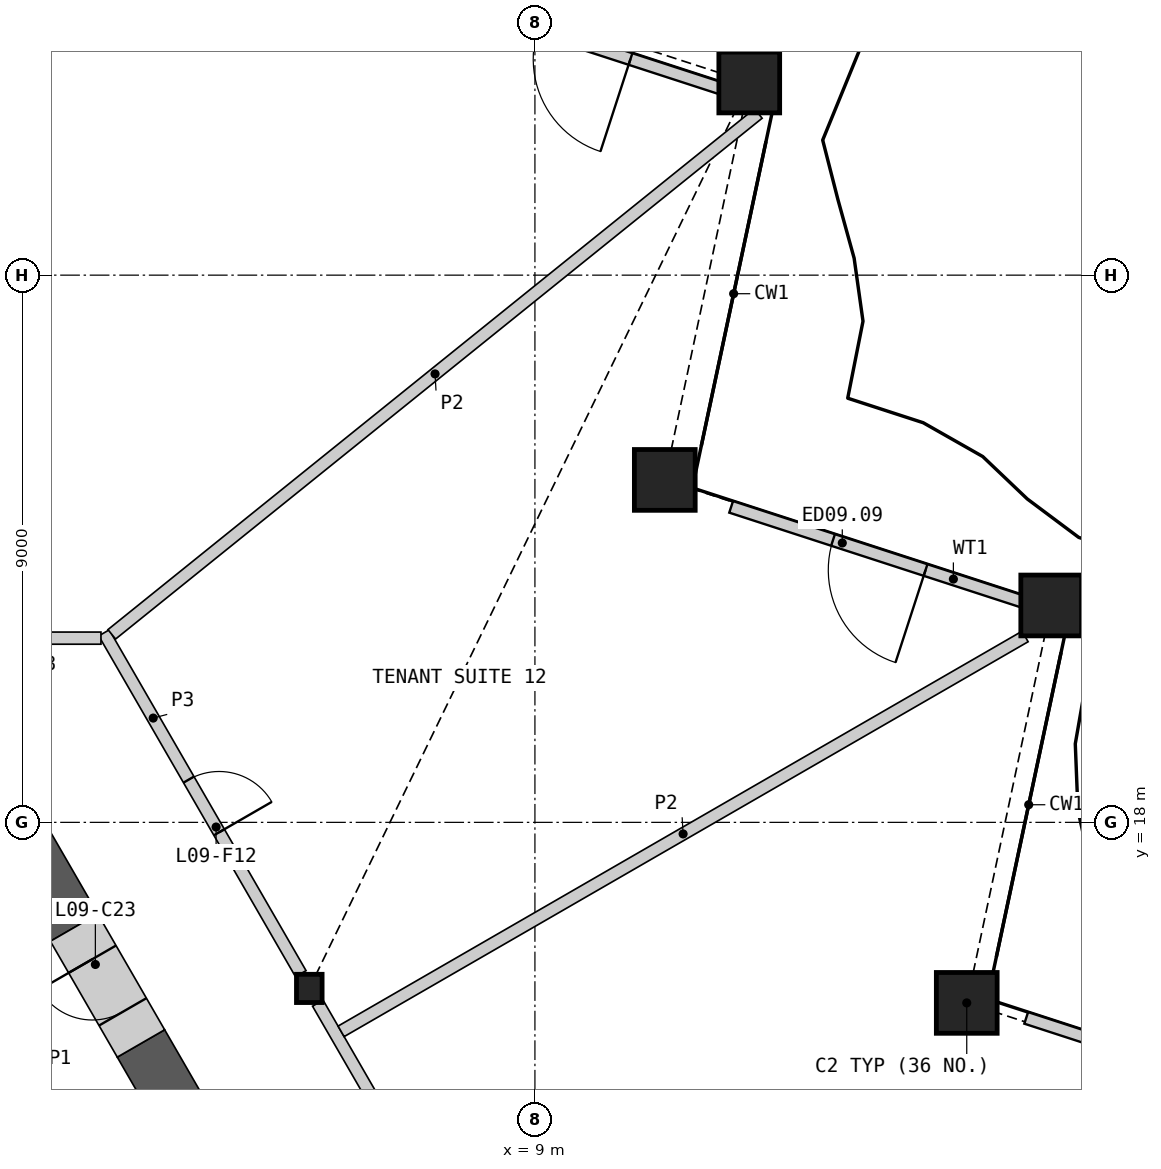
"""IFC4 building model, lengths in metres.
Left out: names, types, materials, properties, quantities, classifications, styles, units other than length and angle.
Written with IfcOpenShell. Run it as: python <this file> out.ifc"""

import sys

from ifc_helpers import new_model, si_unit, direction, frame, frame_2d, origin, origin_2d, place, context, subcontext, project, spatial, rectangle, hollow_rectangle, i_section, extrude, element, fill, save


model = new_model("IFC4")
c1 = context("Model", 3, precision=1e-05, world=origin(), true_north=direction((0.0, 1.0)))
c2 = subcontext(c1, "Body", "Model", "MODEL_VIEW")
j1 = project(units=[si_unit("LENGTHUNIT", "METRE"), si_unit("PLANEANGLEUNIT", "RADIAN")], contexts=[c1])
p1 = place(None, origin())
s1 = spatial("IfcSite", under=j1, at=p1, CompositionType="ELEMENT")
p2 = place(p1, origin())
s2 = spatial("IfcBuilding", under=s1, at=p2, CompositionType="ELEMENT")
p3 = place(p2, frame((0.0, 0.0, 46.8)))
s3 = spatial("IfcBuildingStorey", under=s2, at=p3, CompositionType="ELEMENT", Elevation=46.8)
for number, where, z_axis, x_axis in (
    (1, (16.102, 15.031, 0.0), (0.0, 0.0, 1.0), (1.0, 0.0, 0.0)),
    (2, (17.491, 21.567, 0.0), (0.0, 0.0, 1.0), (1.0, 0.0, 0.0)),
    (3, (11.136, 23.632, 0.0), (0.0, 0.0, 1.0), (1.0, 0.0, 0.0)),
    (4, (12.525, 30.169, 0.0), (0.0, 0.0, 1.0), (1.0, 0.0, 0.0)),
):
    element("IfcColumn", number, at=place(p3, frame(where, z_axis=z_axis, x_axis=x_axis)), inside=s3, PredefinedType="COLUMN", context=c2, shape_type="SweptSolid", body=[
        extrude(hollow_rectangle(XDim=1.0, YDim=1.0, WallThickness=0.07, at=origin_2d()), origin(), (0.0, 0.0, 1.0), 4.2),
    ])
p4 = place(p3, frame((5.289, 15.269, 0.0), z_axis=(0.0, 0.0, 1.0), x_axis=(1.0, 0.0, 0.0)))
e5 = element("IfcColumn", 5, at=p4, inside=s3, PredefinedType="COLUMN", context=c2, shape_type="SweptSolid", body=[
    extrude(i_section(OverallWidth=0.421, OverallDepth=0.465, WebThickness=0.045, FlangeThickness=0.072, at=origin_2d()), origin(), (0.0, 0.0, 1.0), 4.2),
])
p5 = place(p3, frame((21.953, 13.2, 0.0), z_axis=(0.0, 0.0, 1.0), x_axis=(-0.951052624268, 0.309028972547, 0.0)))
e6 = element("IfcWall", 6, at=p5, inside=s3, PredefinedType="SOLIDWALL", context=c2, shape_type="SweptSolid", body=[
    extrude(rectangle(XDim=5.124, YDim=0.2, at=frame_2d((2.562, 0.0))), origin(), (0.0, 0.0, 1.0), 3.189),
])
p6 = place(p5, frame((1.762, 0.0, 0.0)))
e7 = element("IfcOpeningElement", 7, at=p6, cuts=e6, PredefinedType="OPENING", context=c2, shape_type="SweptSolid", body=[
    extrude(rectangle(XDim=1.6, YDim=2.4, at=frame_2d((0.8, 1.2))), frame((0.0, 0.11, 0.0), z_axis=(0.0, -1.0, 0.0), x_axis=(1.0, 0.0, 0.0)), (0.0, 0.0, 1.0), 0.22),
])
p7 = place(p3, frame((17.1, 21.605, 0.0), z_axis=(0.0, 0.0, 1.0), x_axis=(-0.951048073862, 0.309042976306, 0.0)))
e8 = element("IfcWall", 8, at=p7, inside=s3, PredefinedType="SOLIDWALL", context=c2, shape_type="SweptSolid", body=[
    extrude(rectangle(XDim=5.124, YDim=0.2, at=frame_2d((2.562, 0.0))), origin(), (0.0, 0.0, 1.0), 3.189),
])
p8 = place(p7, frame((1.762, 0.0, 0.0)))
e9 = element("IfcOpeningElement", 9, at=p8, cuts=e8, PredefinedType="OPENING", context=c2, shape_type="SweptSolid", body=[
    extrude(rectangle(XDim=1.6, YDim=2.4, at=frame_2d((0.8, 1.2))), frame((0.0, 0.11, 0.0), z_axis=(0.0, -1.0, 0.0), x_axis=(1.0, 0.0, 0.0)), (0.0, 0.0, 1.0), 0.22),
])
p9 = place(p3, frame((12.248, 30.01, 0.0), z_axis=(0.0, 0.0, 1.0), x_axis=(-0.951052624268, 0.309028972547, 0.0)))
e10 = element("IfcWall", 10, at=p9, inside=s3, PredefinedType="SOLIDWALL", context=c2, shape_type="SweptSolid", body=[
    extrude(rectangle(XDim=5.124, YDim=0.2, at=frame_2d((2.562, 0.0))), origin(), (0.0, 0.0, 1.0), 3.189),
])
p10 = place(p9, frame((1.762, 0.0, 0.0)))
e11 = element("IfcOpeningElement", 11, at=p10, cuts=e10, PredefinedType="OPENING", context=c2, shape_type="SweptSolid", body=[
    extrude(rectangle(XDim=1.6, YDim=2.4, at=frame_2d((0.8, 1.2))), frame((0.0, 0.11, 0.0), z_axis=(0.0, -1.0, 0.0), x_axis=(1.0, 0.0, 0.0)), (0.0, 0.0, 1.0), 0.22),
])
p11 = place(p3, frame((-1.619, 15.026, 0.0), z_axis=(0.0, 0.0, 1.0), x_axis=(0.866015917575, -0.500016430238, 0.0)))
e12 = element("IfcWall", 12, at=p11, inside=s3, PredefinedType="PARTITIONING", context=c2, shape_type="SweptSolid", body=[
    extrude(rectangle(XDim=5.607, YDim=0.15, at=frame_2d((2.804, 0.0))), origin(), (0.0, 0.0, 1.0), 3.8),
])
p12 = place(p3, frame((4.509, 10.921, 0.0), z_axis=(0.0, 0.0, 1.0), x_axis=(-0.49999004381, 0.866031151917, 0.0)))
e13 = element("IfcWall", 13, at=p12, inside=s3, PredefinedType="SHEAR", context=c2, shape_type="SweptSolid", body=[
    extrude(rectangle(XDim=3.975, YDim=0.9, at=frame_2d((1.988, 0.0))), origin(), (0.0, 0.0, 1.0), 3.8),
])
p13 = place(p3, frame((1.421, 16.269, 0.0), z_axis=(0.0, 0.0, 1.0), x_axis=(-0.500009360108, 0.866019999656, 0.0)))
e14 = element("IfcWall", 14, at=p13, inside=s3, PredefinedType="SHEAR", context=c2, shape_type="SweptSolid", body=[
    extrude(rectangle(XDim=2.062, YDim=0.9, at=frame_2d((1.031, 0.0))), origin(), (0.0, 0.0, 1.0), 3.8),
])
p14 = place(p3, frame((2.521, 14.364, 0.0), z_axis=(0.0, 0.0, 1.0), x_axis=(-0.50002983664, 0.866008176907, 0.0)))
e15 = element("IfcWall", 15, at=p14, inside=s3, PredefinedType="SHEAR", context=c2, shape_type="SweptSolid", body=[
    extrude(rectangle(XDim=2.2, YDim=0.9, at=frame_2d((1.1, 0.0))), origin(), (0.0, 0.0, 1.0), 3.8),
])
p15 = place(p14, frame((0.6, 0.0, 0.0)))
e16 = element("IfcOpeningElement", 16, at=p15, cuts=e15, PredefinedType="OPENING", context=c2, shape_type="SweptSolid", body=[
    extrude(rectangle(XDim=1.0, YDim=2.1, at=frame_2d((0.5, 1.05))), frame((0.0, 0.46, 0.0), z_axis=(0.0, -1.0, 0.0), x_axis=(1.0, 0.0, 0.0)), (0.0, 0.0, 1.0), 0.92),
])
p16 = place(p3, frame((5.429, 15.026, 0.0), z_axis=(0.0, 0.0, 1.0), x_axis=(0.50001002959, -0.86601961312, 0.0)))
e17 = element("IfcWall", 17, at=p16, inside=s3, PredefinedType="PARTITIONING", context=c2, shape_type="SweptSolid", body=[
    extrude(rectangle(XDim=10.019, YDim=0.2, at=frame_2d((5.009, 0.0))), origin(), (0.0, 0.0, 1.0), 3.8),
])
p17 = place(p16, frame((4.86, 0.0, 0.0)))
e18 = element("IfcOpeningElement", 18, at=p17, cuts=e17, PredefinedType="OPENING", context=c2, shape_type="SweptSolid", body=[
    extrude(rectangle(XDim=1.0, YDim=2.1, at=frame_2d((0.5, 1.05))), frame((0.0, 0.11, 0.0), z_axis=(0.0, -1.0, 0.0), x_axis=(1.0, 0.0, 0.0)), (0.0, 0.0, 1.0), 0.22),
])
p18 = place(p3, frame((1.913, 21.116, 0.0), z_axis=(0.0, 0.0, 1.0), x_axis=(0.500001069878, -0.866024786089, 0.0)))
e19 = element("IfcWall", 19, at=p18, inside=s3, PredefinedType="PARTITIONING", context=c2, shape_type="SweptSolid", body=[
    extrude(rectangle(XDim=6.473, YDim=0.2, at=frame_2d((3.236, 0.0))), origin(), (0.0, 0.0, 1.0), 3.8),
])
p19 = place(p18, frame((2.787, 0.0, 0.0)))
e20 = element("IfcOpeningElement", 20, at=p19, cuts=e19, PredefinedType="OPENING", context=c2, shape_type="SweptSolid", body=[
    extrude(rectangle(XDim=1.0, YDim=2.1, at=frame_2d((0.5, 1.05))), frame((0.0, 0.11, 0.0), z_axis=(0.0, -1.0, 0.0), x_axis=(1.0, 0.0, 0.0)), (0.0, 0.0, 1.0), 0.22),
])
p20 = place(p3, frame((-1.863, 21.03, 0.0), z_axis=(0.0, 0.0, 1.0), x_axis=(1.0, 0.0, 0.0)))
e21 = element("IfcWall", 21, at=p20, inside=s3, PredefinedType="PARTITIONING", context=c2, shape_type="SweptSolid", body=[
    extrude(rectangle(XDim=3.726, YDim=0.2, at=frame_2d((1.863, 0.0))), origin(), (0.0, 0.0, 1.0), 3.8),
])
p21 = place(p20, frame((0.963, 0.0, 0.0)))
e22 = element("IfcOpeningElement", 22, at=p21, cuts=e21, PredefinedType="OPENING", context=c2, shape_type="SweptSolid", body=[
    extrude(rectangle(XDim=1.8, YDim=2.1, at=frame_2d((0.9, 1.05))), frame((0.0, 0.11, 0.0), z_axis=(0.0, -1.0, 0.0), x_axis=(1.0, 0.0, 0.0)), (0.0, 0.0, 1.0), 0.22),
])
p22 = place(p3, frame((2.041, 21.093, 0.0), z_axis=(0.0, 0.0, 1.0), x_axis=(0.778730857737, 0.627358152261, 0.0)))
e23 = element("IfcWall", 23, at=p22, inside=s3, PredefinedType="PARTITIONING", context=c2, shape_type="SweptSolid", body=[
    extrude(rectangle(XDim=13.654, YDim=0.2, at=frame_2d((6.827, 0.0))), origin(), (0.0, 0.0, 1.0), 2.885),
])
p23 = place(p3, frame((5.812, 14.562, 0.0), z_axis=(0.0, 0.0, 1.0), x_axis=(0.866020631549, 0.500008265664, 0.0)))
e24 = element("IfcWall", 24, at=p23, inside=s3, PredefinedType="PARTITIONING", context=c2, shape_type="SweptSolid", body=[
    extrude(rectangle(XDim=12.989, YDim=0.2, at=frame_2d((6.495, 0.0))), origin(), (0.0, 0.0, 1.0), 2.885),
])
p24 = place(p8, origin())
e25 = element("IfcDoor", 25, at=p24, inside=s3, OperationType="DOUBLE_DOOR_SINGLE_SWING", PredefinedType="DOOR", context=c2, shape_type="SweptSolid", body=[
    extrude(rectangle(XDim=1.6, YDim=2.4, at=frame_2d((0.8, 1.2))), frame((0.0, 0.025, 0.0), z_axis=(0.0, -1.0, 0.0), x_axis=(1.0, 0.0, 0.0)), (0.0, 0.0, 1.0), 0.05),
])
fill(e9, e25)
p25 = place(p10, origin())
e26 = element("IfcDoor", 26, at=p25, inside=s3, OperationType="DOUBLE_DOOR_SINGLE_SWING", PredefinedType="DOOR", context=c2, shape_type="SweptSolid", body=[
    extrude(rectangle(XDim=1.6, YDim=2.4, at=frame_2d((0.8, 1.2))), frame((0.0, 0.025, 0.0), z_axis=(0.0, -1.0, 0.0), x_axis=(1.0, 0.0, 0.0)), (0.0, 0.0, 1.0), 0.05),
])
fill(e11, e26)
p26 = place(p15, origin())
e27 = element("IfcDoor", 27, at=p26, inside=s3, OperationType="SINGLE_SWING_RIGHT", PredefinedType="DOOR", context=c2, shape_type="SweptSolid", body=[
    extrude(rectangle(XDim=1.0, YDim=2.1, at=frame_2d((0.5, 1.05))), frame((0.0, 0.205, 0.0), z_axis=(0.0, -1.0, 0.0), x_axis=(1.0, 0.0, 0.0)), (0.0, 0.0, 1.0), 0.05),
])
fill(e16, e27)
p27 = place(p19, origin())
e28 = element("IfcDoor", 28, at=p27, inside=s3, OperationType="SINGLE_SWING_RIGHT", PredefinedType="DOOR", context=c2, shape_type="SweptSolid", body=[
    extrude(rectangle(XDim=1.0, YDim=2.1, at=frame_2d((0.5, 1.05))), frame((0.0, 0.025, 0.0), z_axis=(0.0, -1.0, 0.0), x_axis=(1.0, 0.0, 0.0)), (0.0, 0.0, 1.0), 0.05),
])
fill(e20, e28)
save(model, sys.argv[1])
